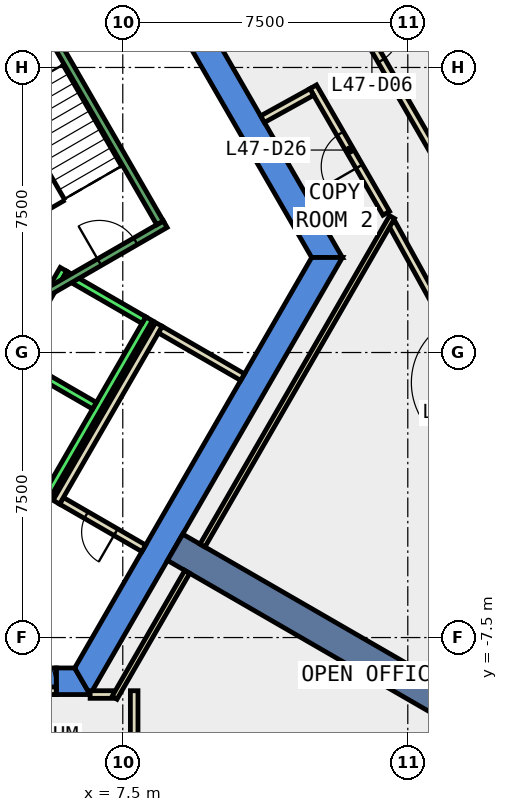
"""IFC4 building model, lengths in metres.
Left out: names, types, materials, properties, quantities, classifications, styles, units other than length and angle.
Written with IfcOpenShell. Run it as: python <this file> out.ifc"""

import sys

from ifc_helpers import new_model, si_unit, direction, frame, frame_2d, origin, place, context, subcontext, project, spatial, polyline, rectangle, outline, extrude, element, fill, save


model = new_model("IFC4")
c1 = context("Model", 3, precision=1e-05, world=origin(), true_north=direction((0.0, 1.0)))
c2 = subcontext(c1, "Body", "Model", "MODEL_VIEW")
j1 = project(units=[si_unit("LENGTHUNIT", "METRE"), si_unit("PLANEANGLEUNIT", "RADIAN")], contexts=[c1])
p1 = place(None, origin())
s1 = spatial("IfcSite", under=j1, at=p1, CompositionType="ELEMENT")
p2 = place(p1, origin())
s2 = spatial("IfcBuilding", under=s1, at=p2, CompositionType="ELEMENT")
p3 = place(p2, frame((0.0, 0.0, 210.8)))
s3 = spatial("IfcBuildingStorey", under=s2, at=p3, CompositionType="ELEMENT", Elevation=210.8)
p4 = place(p3, frame((0.0, 0.0, -0.4)))
e1 = element("IfcWall", 1, at=p4, inside=s3, PredefinedType="SHEAR", context=c2, shape_type="SweptSolid", body=[
    extrude(outline(polyline([(8.084, 11.498), (7.478, 11.148), (12.471, 2.5), (13.279, 2.5), (8.084, 11.498)])), origin(), (0.0, 0.0, 1.0), 4.2),
])
p5 = place(p3, frame((0.0, 0.0, -0.4)))
e2 = element("IfcWall", 2, at=p5, inside=s3, PredefinedType="SHEAR", context=c2, shape_type="SweptSolid", body=[
    extrude(outline(polyline([(5.75, -8.3), (5.75, -9.0), (6.64, -9.0), (6.235, -8.3), (5.75, -8.3)])), origin(), (0.0, 0.0, 1.0), 4.2),
])
p6 = place(p3, frame((0.0, 0.0, 3.6)))
e3 = element("IfcWall", 3, at=p6, inside=s3, PredefinedType="SHEAR", context=c2, shape_type="SweptSolid", body=[
    extrude(outline(polyline([(5.75, -9.0), (5.75, -8.3), (3.75, -8.3), (3.75, -9.0), (5.75, -9.0)])), origin(), (0.0, 0.0, 1.0), 0.2),
])
p7 = place(p3, frame((0.0, 0.0, -0.4)))
e4 = element("IfcWall", 4, at=p7, inside=s3, PredefinedType="SHEAR", context=c2, shape_type="SweptSolid", body=[
    extrude(outline(polyline([(6.64, -9.0), (13.279, 2.5), (12.471, 2.5), (6.235, -8.3), (6.64, -9.0)])), origin(), (0.0, 0.0, 1.0), 4.2),
])
p8 = place(p3, frame((8.877, -5.125, -0.4), z_axis=(0.0, 0.0, 1.0), x_axis=(0.866017533419, -0.500013631625, 0.0)))
e5 = element("IfcWall", 5, at=p8, inside=s3, PredefinedType="SHEAR", context=c2, shape_type="SweptSolid", body=[
    extrude(rectangle(XDim=9.0, YDim=0.8, at=frame_2d((4.5, 0.0))), origin(), (0.0, 0.0, 1.0), 4.2),
])
p9 = place(p3, frame((14.433, 3.663, 0.0), z_axis=(0.0, 0.0, 1.0), x_axis=(-0.500149526678, 0.865939057303, 0.0)))
e6 = element("IfcWall", 6, at=p9, inside=s3, PredefinedType="PARTITIONING", context=c2, shape_type="SweptSolid", body=[
    extrude(rectangle(XDim=3.843, YDim=0.2, at=frame_2d((1.921, 0.0))), origin(), (0.0, 0.0, 1.0), 3.8),
])
p10 = place(p9, frame((1.422, 0.0, 0.0)))
e7 = element("IfcOpeningElement", 7, at=p10, cuts=e6, PredefinedType="OPENING", context=c2, shape_type="SweptSolid", body=[
    extrude(rectangle(XDim=1.0, YDim=2.1, at=frame_2d((0.5, 1.05))), frame((0.0, 0.11, 0.0), z_axis=(0.0, -1.0, 0.0), x_axis=(1.0, 0.0, 0.0)), (0.0, 0.0, 1.0), 0.22),
])
p11 = place(p3, frame((12.474, 6.856, 0.0), z_axis=(0.0, 0.0, 1.0), x_axis=(-0.875305814696, -0.483569778584, 0.0)))
e8 = element("IfcWall", 8, at=p11, inside=s3, PredefinedType="PARTITIONING", context=c2, shape_type="SweptSolid", body=[
    extrude(rectangle(XDim=1.481, YDim=0.2, at=frame_2d((0.74, 0.0))), origin(), (0.0, 0.0, 1.0), 3.8),
])
p12 = place(p3, frame((18.344, -3.417, 0.0), z_axis=(0.0, 0.0, 1.0), x_axis=(-0.483555501116, 0.875313702247, 0.0)))
e9 = element("IfcWall", 9, at=p12, inside=s3, PredefinedType="PARTITIONING", context=c2, shape_type="SweptSolid", body=[
    extrude(rectangle(XDim=7.801, YDim=0.2, at=frame_2d((3.9, 0.0))), origin(), (0.0, 0.0, 1.0), 3.8),
])
p13 = place(p12, frame((3.0, 0.0, 0.0)))
e10 = element("IfcOpeningElement", 10, at=p13, cuts=e9, PredefinedType="OPENING", context=c2, shape_type="SweptSolid", body=[
    extrude(rectangle(XDim=1.8, YDim=2.1, at=frame_2d((0.9, 1.05))), frame((0.0, 0.11, 0.0), z_axis=(0.0, -1.0, 0.0), x_axis=(1.0, 0.0, 0.0)), (0.0, 0.0, 1.0), 0.22),
])
p14 = place(p3, frame((11.987, 11.698, 0.0), z_axis=(0.0, 0.0, 1.0), x_axis=(0.500075329254, -0.865981908051, 0.0)))
e11 = element("IfcWall", 11, at=p14, inside=s3, PredefinedType="PARTITIONING", context=c2, shape_type="SweptSolid", body=[
    extrude(rectangle(XDim=8.125, YDim=0.2, at=frame_2d((4.062, 0.0))), origin(), (0.0, 0.0, 1.0), 3.8),
])
p15 = place(p14, frame((3.637, 0.0, 0.0)))
e12 = element("IfcOpeningElement", 12, at=p15, cuts=e11, PredefinedType="OPENING", context=c2, shape_type="SweptSolid", body=[
    extrude(rectangle(XDim=1.0, YDim=2.1, at=frame_2d((0.5, 1.05))), frame((0.0, 0.11, 0.0), z_axis=(0.0, -1.0, 0.0), x_axis=(1.0, 0.0, 0.0)), (0.0, 0.0, 1.0), 0.22),
])
p16 = place(p3, frame((8.053, -5.152, 0.0), z_axis=(0.0, 0.0, 1.0), x_axis=(-0.866022959057, 0.500004234368, 0.0)))
e13 = element("IfcWall", 13, at=p16, inside=s3, PredefinedType="PARTITIONING", context=c2, shape_type="SweptSolid", body=[
    extrude(rectangle(XDim=2.5, YDim=0.2, at=frame_2d((1.25, 0.0))), origin(), (0.0, 0.0, 1.0), 3.8),
])
p17 = place(p16, frame((0.85, 0.0, 0.0)))
e14 = element("IfcOpeningElement", 14, at=p17, cuts=e13, PredefinedType="OPENING", context=c2, shape_type="SweptSolid", body=[
    extrude(rectangle(XDim=0.9, YDim=2.1, at=frame_2d((0.45, 1.05))), frame((0.0, 0.11, 0.0), z_axis=(0.0, -1.0, 0.0), x_axis=(1.0, 0.0, 0.0)), (0.0, 0.0, 1.0), 0.22),
])
p18 = place(p3, frame((5.751, -3.938, 0.0), z_axis=(0.0, 0.0, 1.0), x_axis=(0.500034260056, 0.866005622828, 0.0)))
e15 = element("IfcWall", 15, at=p18, inside=s3, PredefinedType="PARTITIONING", context=c2, shape_type="SweptSolid", body=[
    extrude(rectangle(XDim=5.399, YDim=0.2, at=frame_2d((2.7, 0.0))), origin(), (0.0, 0.0, 1.0), 3.8),
])
p19 = place(p3, frame((8.488, 0.602, 0.0), z_axis=(0.0, 0.0, 1.0), x_axis=(0.866022959057, -0.500004234368, 0.0)))
e16 = element("IfcWall", 16, at=p19, inside=s3, PredefinedType="PARTITIONING", context=c2, shape_type="SweptSolid", body=[
    extrude(rectangle(XDim=2.5, YDim=0.2, at=frame_2d((1.25, 0.0))), origin(), (0.0, 0.0, 1.0), 3.8),
])
p20 = place(p3, frame((6.641, -8.999, 0.0), z_axis=(0.0, 0.0, 1.0), x_axis=(1.0, 0.0, 0.0)))
e17 = element("IfcWall", 17, at=p20, inside=s3, PredefinedType="PARTITIONING", context=c2, shape_type="SweptSolid", body=[
    extrude(rectangle(XDim=0.617, YDim=0.2, at=frame_2d((0.309, 0.0))), origin(), (0.0, 0.0, 1.0), 3.8),
])
p21 = place(p3, frame((7.283, -9.086, 0.0), z_axis=(0.0, 0.0, 1.0), x_axis=(0.500035303972, 0.866005020067, 0.0)))
e18 = element("IfcWall", 18, at=p21, inside=s3, PredefinedType="PARTITIONING", context=c2, shape_type="SweptSolid", body=[
    extrude(rectangle(XDim=3.828, YDim=0.15, at=frame_2d((1.914, 0.0))), origin(), (0.0, 0.0, 1.0), 3.8),
])
p22 = place(p3, frame((7.8, -8.899, 0.0), z_axis=(0.0, 0.0, 1.0), x_axis=(0.0, -1.0, 0.0)))
e19 = element("IfcWall", 19, at=p22, inside=s3, PredefinedType="PARTITIONING", context=c2, shape_type="SweptSolid", body=[
    extrude(rectangle(XDim=5.542, YDim=0.2, at=frame_2d((2.771, 0.0))), origin(), (0.0, 0.0, 1.0), 3.8),
])
p23 = place(p3, frame((3.75, -8.9, 0.0), z_axis=(0.0, 0.0, 1.0), x_axis=(1.0, 0.0, 0.0)))
e20 = element("IfcWall", 20, at=p23, inside=s3, PredefinedType="PARTITIONING", context=c2, shape_type="SweptSolid", body=[
    extrude(rectangle(XDim=2.0, YDim=0.2, at=frame_2d((1.0, 0.0))), origin(), (0.0, 0.0, 1.0), 2.4),
])
p24 = place(p23, frame((0.19, 0.0, 0.0)))
e21 = element("IfcOpeningElement", 21, at=p24, cuts=e20, PredefinedType="OPENING", context=c2, shape_type="SweptSolid", body=[
    extrude(rectangle(XDim=1.8, YDim=2.1, at=frame_2d((0.9, 1.05))), frame((0.0, 0.11, 0.0), z_axis=(0.0, -1.0, 0.0), x_axis=(1.0, 0.0, 0.0)), (0.0, 0.0, 1.0), 0.22),
])
p25 = place(p3, frame((9.597, -5.079, 0.0), z_axis=(0.0, 0.0, 1.0), x_axis=(0.499962477963, 0.866047066059, 0.0)))
e22 = element("IfcWall", 22, at=p25, inside=s3, PredefinedType="PARTITIONING", context=c2, shape_type="SweptSolid", body=[
    extrude(rectangle(XDim=9.979, YDim=0.15, at=frame_2d((4.989, 0.0))), origin(), (0.0, 0.0, 1.0), 3.8),
])
p26 = place(p3, frame((3.24, -2.488, 0.0), z_axis=(0.0, 0.0, 1.0), x_axis=(0.500034260056, 0.866005622828, 0.0)))
e23 = element("IfcWall", 23, at=p26, inside=s3, PredefinedType="STANDARD", context=c2, shape_type="SweptSolid", body=[
    extrude(rectangle(XDim=5.399, YDim=0.2, at=frame_2d((2.7, 0.0))), origin(), (0.0, 0.0, 1.0), 3.8),
])
p27 = place(p26, frame((3.225, 0.0, 0.0)))
e24 = element("IfcOpeningElement", 24, at=p27, cuts=e23, PredefinedType="OPENING", context=c2, shape_type="SweptSolid", body=[
    extrude(rectangle(XDim=1.1, YDim=2.1, at=frame_2d((0.55, 1.05))), frame((0.0, 0.11, 0.0), z_axis=(0.0, -1.0, 0.0), x_axis=(1.0, 0.0, 0.0)), (0.0, 0.0, 1.0), 0.22),
])
p28 = place(p26, frame((1.225, 0.0, 0.0)))
e25 = element("IfcOpeningElement", 25, at=p28, cuts=e23, PredefinedType="OPENING", context=c2, shape_type="SweptSolid", body=[
    extrude(rectangle(XDim=1.1, YDim=2.1, at=frame_2d((0.55, 1.05))), frame((0.0, 0.11, 0.0), z_axis=(0.0, -1.0, 0.0), x_axis=(1.0, 0.0, 0.0)), (0.0, 0.0, 1.0), 0.22),
])
p29 = place(p3, frame((5.492, -3.788, 0.0), z_axis=(0.0, 0.0, 1.0), x_axis=(0.500034260056, 0.866005622828, 0.0)))
e26 = element("IfcWall", 26, at=p29, inside=s3, PredefinedType="STANDARD", context=c2, shape_type="SweptSolid", body=[
    extrude(rectangle(XDim=5.399, YDim=0.2, at=frame_2d((2.7, 0.0))), origin(), (0.0, 0.0, 1.0), 3.8),
])
for number, where, z_axis, x_axis in (
    (27, (4.677, -0.2, 0.0), (0.0, 0.0, 1.0), (0.866, -0.5, 0.0)),
    (28, (5.977, 2.052, 0.0), (0.0, 0.0, 1.0), (0.866, -0.5, 0.0)),
):
    element("IfcWall", number, at=place(p3, frame(where, z_axis=z_axis, x_axis=x_axis)), inside=s3, PredefinedType="STANDARD", context=c2, shape_type="SweptSolid", body=[
        extrude(rectangle(XDim=2.399, YDim=0.2, at=frame_2d((1.2, 0.0))), origin(), (0.0, 0.0, 1.0), 3.8),
    ])
p30 = place(p3, frame((4.806, 1.176, 0.0), z_axis=(0.0, 0.0, 1.0), x_axis=(0.866059941101, 0.499940174841, 0.0)))
e29 = element("IfcWall", 29, at=p30, inside=s3, PredefinedType="STANDARD", context=c2, shape_type="SweptSolid", body=[
    extrude(rectangle(XDim=4.4, YDim=0.2, at=frame_2d((2.2, 0.0))), origin(), (0.0, 0.0, 1.0), 3.8),
])
p31 = place(p30, frame((2.4, 0.0, 0.0)))
e30 = element("IfcOpeningElement", 30, at=p31, cuts=e29, PredefinedType="OPENING", context=c2, shape_type="SweptSolid", body=[
    extrude(rectangle(XDim=1.1, YDim=2.2, at=frame_2d((0.55, 1.1))), frame((0.0, 0.11, 0.0), z_axis=(0.0, -1.0, 0.0), x_axis=(1.0, 0.0, 0.0)), (0.0, 0.0, 1.0), 0.22),
])
p32 = place(p3, frame((8.48, 3.412, 0.0), z_axis=(0.0, 0.0, 1.0), x_axis=(-0.499978703459, 0.866037698999, 0.0)))
e31 = element("IfcWall", 31, at=p32, inside=s3, PredefinedType="STANDARD", context=c2, shape_type="SweptSolid", body=[
    extrude(rectangle(XDim=6.9, YDim=0.2, at=frame_2d((3.45, 0.0))), origin(), (0.0, 0.0, 1.0), 3.8),
])
p33 = place(p15, origin())
e32 = element("IfcDoor", 32, at=p33, inside=s3, OperationType="SINGLE_SWING_RIGHT", PredefinedType="DOOR", context=c2, shape_type="SweptSolid", body=[
    extrude(rectangle(XDim=1.0, YDim=2.1, at=frame_2d((0.5, 1.05))), frame((0.0, 0.025, 0.0), z_axis=(0.0, -1.0, 0.0), x_axis=(1.0, 0.0, 0.0)), (0.0, 0.0, 1.0), 0.05),
])
fill(e12, e32)
p34 = place(p10, origin())
e33 = element("IfcDoor", 33, at=p34, inside=s3, OperationType="SINGLE_SWING_RIGHT", PredefinedType="DOOR", context=c2, shape_type="SweptSolid", body=[
    extrude(rectangle(XDim=1.0, YDim=2.1, at=frame_2d((0.5, 1.05))), frame((0.0, 0.025, 0.0), z_axis=(0.0, -1.0, 0.0), x_axis=(1.0, 0.0, 0.0)), (0.0, 0.0, 1.0), 0.05),
])
fill(e7, e33)
p35 = place(p17, origin())
e34 = element("IfcDoor", 34, at=p35, inside=s3, OperationType="SINGLE_SWING_LEFT", PredefinedType="DOOR", context=c2, shape_type="SweptSolid", body=[
    extrude(rectangle(XDim=0.9, YDim=2.1, at=frame_2d((0.45, 1.05))), frame((0.0, 0.025, 0.0), z_axis=(0.0, -1.0, 0.0), x_axis=(1.0, 0.0, 0.0)), (0.0, 0.0, 1.0), 0.05),
])
fill(e14, e34)
p36 = place(p24, origin())
e35 = element("IfcDoor", 35, at=p36, inside=s3, OperationType="DOUBLE_DOOR_SINGLE_SWING", PredefinedType="DOOR", context=c2, shape_type="SweptSolid", body=[
    extrude(rectangle(XDim=1.8, YDim=2.1, at=frame_2d((0.9, 1.05))), frame((0.0, 0.025, 0.0), z_axis=(0.0, -1.0, 0.0), x_axis=(1.0, 0.0, 0.0)), (0.0, 0.0, 1.0), 0.05),
])
fill(e21, e35)
p37 = place(p31, origin())
e36 = element("IfcDoor", 36, at=p37, inside=s3, OperationType="SINGLE_SWING_LEFT", PredefinedType="DOOR", context=c2, shape_type="SweptSolid", body=[
    extrude(rectangle(XDim=1.1, YDim=2.2, at=frame_2d((0.55, 1.1))), frame((0.0, 0.025, 0.0), z_axis=(0.0, -1.0, 0.0), x_axis=(1.0, 0.0, 0.0)), (0.0, 0.0, 1.0), 0.05),
])
fill(e30, e36)
save(model, sys.argv[1])
